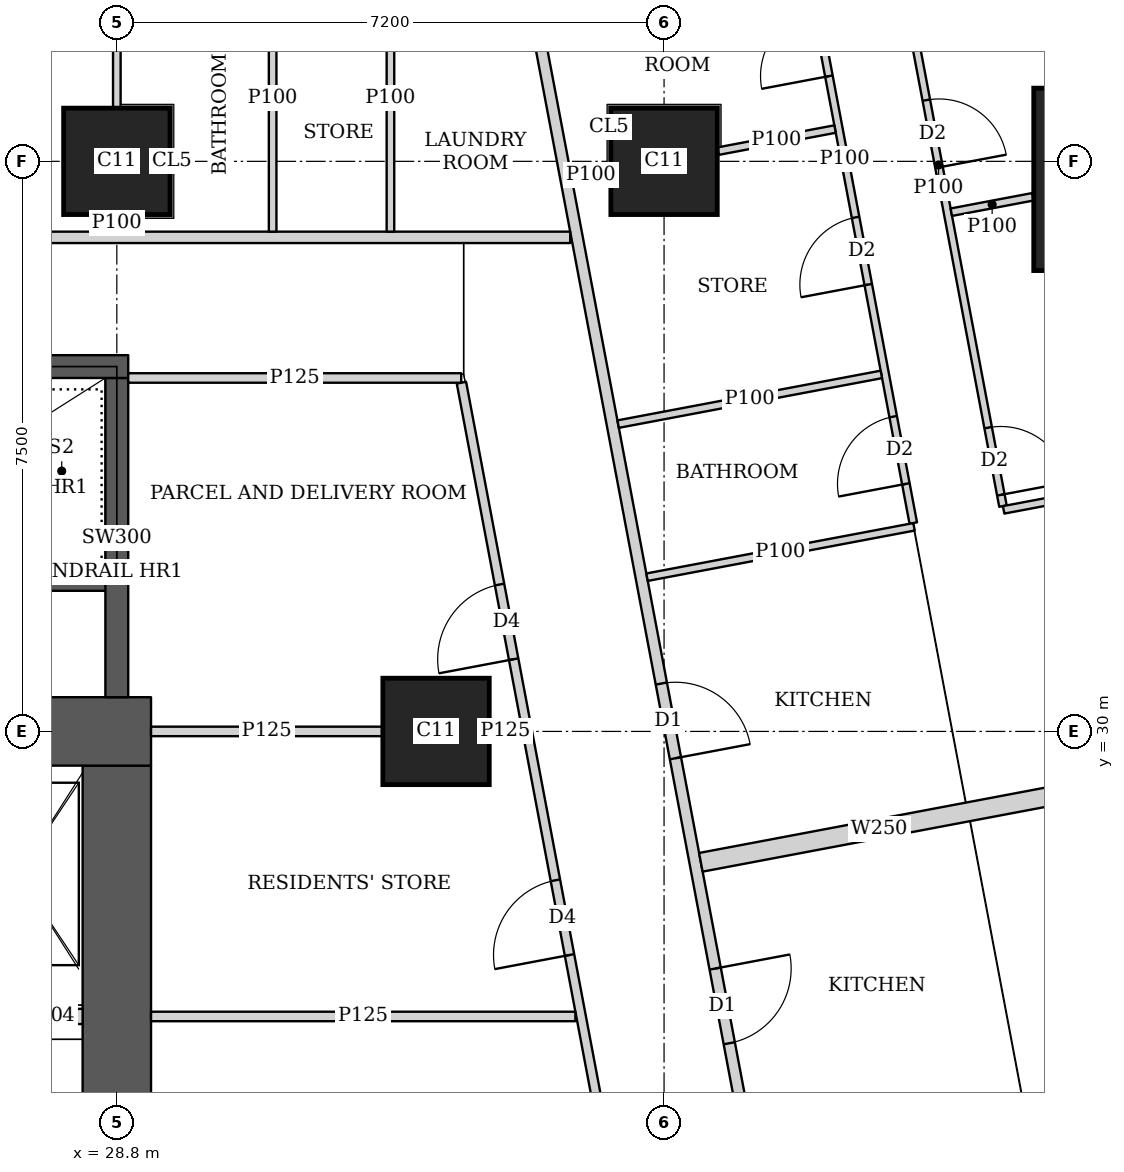
"""IFC4 building model, lengths in metres.
Left out: names, types, materials, properties, quantities, classifications, styles, units other than length and angle.
Written with IfcOpenShell. Run it as: python <this file> out.ifc"""

import sys

from ifc_helpers import new_model, si_unit, direction, frame, frame_2d, origin, origin_2d, place, context, subcontext, project, spatial, rectangle, extrude, element, fill, save


model = new_model("IFC4")
c1 = context("Model", 3, precision=1e-05, world=origin(), true_north=direction((0.0, 1.0)))
c2 = subcontext(c1, "Body", "Model", "MODEL_VIEW")
j1 = project(units=[si_unit("LENGTHUNIT", "METRE"), si_unit("PLANEANGLEUNIT", "RADIAN")], contexts=[c1])
p1 = place(None, origin())
s1 = spatial("IfcSite", under=j1, at=p1, CompositionType="ELEMENT")
p2 = place(p1, origin())
s2 = spatial("IfcBuilding", under=s1, at=p2, CompositionType="ELEMENT")
p3 = place(p2, frame((0.0, 0.0, 212.45)))
s3 = spatial("IfcBuildingStorey", under=s2, at=p3, CompositionType="ELEMENT", Elevation=212.45)
for number, where, z_axis, x_axis in (
    (1, (33.0, 30.0, 0.0), (0.0, 0.0, 1.0), (1.0, 0.0, 0.0)),
    (2, (28.8, 37.5, 0.0), (0.0, 0.0, 1.0), (1.0, 0.0, 0.0)),
    (3, (36.0, 37.5, 0.0), (0.0, 0.0, 1.0), (1.0, 0.0, 0.0)),
):
    element("IfcColumn", number, at=place(p3, frame(where, z_axis=z_axis, x_axis=x_axis)), inside=s3, PredefinedType="COLUMN", context=c2, shape_type="SweptSolid", body=[
        extrude(rectangle(XDim=1.4, YDim=1.4, at=origin_2d()), origin(), (0.0, 0.0, 1.0), 3.75),
    ])
p4 = place(p3, frame((42.064, 37.263, 0.0), z_axis=(0.0, 0.0, 1.0), x_axis=(1.0, 0.0, 0.0)))
e4 = element("IfcColumn", 4, at=p4, inside=s3, PredefinedType="COLUMN", context=c2, shape_type="SweptSolid", body=[
    extrude(rectangle(XDim=2.4, YDim=2.4, at=origin_2d()), origin(), (0.0, 0.0, 1.0), 3.75),
])
p5 = place(p3, frame((13.95, 30.0, 0.0), z_axis=(0.0, 0.0, 1.0), x_axis=(1.0, 0.0, 0.0)))
e5 = element("IfcWall", 5, at=p5, inside=s3, PredefinedType="SHEAR", context=c2, shape_type="SweptSolid", body=[
    extrude(rectangle(XDim=15.3, YDim=0.9, at=frame_2d((7.65, 0.0))), origin(), (0.0, 0.0, 1.0), 3.75),
])
p6 = place(p5, frame((4.45, 0.0, 0.0)))
e6 = element("IfcOpeningElement", 6, at=p6, cuts=e5, PredefinedType="OPENING", context=c2, shape_type="SweptSolid", body=[
    extrude(rectangle(XDim=1.8, YDim=2.1, at=frame_2d((0.9, 1.05))), frame((0.0, 0.46, 0.0), z_axis=(0.0, -1.0, 0.0), x_axis=(1.0, 0.0, 0.0)), (0.0, 0.0, 1.0), 0.92),
])
p7 = place(p5, frame((10.7, 0.0, 0.0)))
e7 = element("IfcOpeningElement", 7, at=p7, cuts=e5, PredefinedType="OPENING", context=c2, shape_type="SweptSolid", body=[
    extrude(rectangle(XDim=1.1, YDim=2.1, at=frame_2d((0.55, 1.05))), frame((0.0, 0.46, 0.0), z_axis=(0.0, -1.0, 0.0), x_axis=(1.0, 0.0, 0.0)), (0.0, 0.0, 1.0), 0.92),
])
p8 = place(p3, frame((28.8, 15.45, 0.0), z_axis=(0.0, 0.0, 1.0), x_axis=(0.0, 1.0, 0.0)))
e8 = element("IfcWall", 8, at=p8, inside=s3, PredefinedType="SHEAR", context=c2, shape_type="SweptSolid", body=[
    extrude(rectangle(XDim=14.1, YDim=0.9, at=frame_2d((7.05, 0.0))), origin(), (0.0, 0.0, 1.0), 3.75),
])
p9 = place(p3, frame((21.45, 34.8, 0.0), z_axis=(0.0, 0.0, 1.0), x_axis=(1.0, 0.0, 0.0)))
e9 = element("IfcWall", 9, at=p9, inside=s3, PredefinedType="SHEAR", context=c2, shape_type="SweptSolid", body=[
    extrude(rectangle(XDim=7.5, YDim=0.3, at=frame_2d((3.75, 0.0))), origin(), (0.0, 0.0, 1.0), 3.75),
])
p10 = place(p9, frame((0.5, 0.0, 0.0)))
e10 = element("IfcOpeningElement", 10, at=p10, cuts=e9, PredefinedType="OPENING", context=c2, shape_type="SweptSolid", body=[
    extrude(rectangle(XDim=1.1, YDim=2.1, at=frame_2d((0.55, 1.05))), frame((0.0, 0.16, 0.0), z_axis=(0.0, -1.0, 0.0), x_axis=(1.0, 0.0, 0.0)), (0.0, 0.0, 1.0), 0.32),
])
p11 = place(p3, frame((28.8, 30.45, 0.0), z_axis=(0.0, 0.0, 1.0), x_axis=(0.0, 1.0, 0.0)))
e11 = element("IfcWall", 11, at=p11, inside=s3, PredefinedType="SHEAR", context=c2, shape_type="SweptSolid", body=[
    extrude(rectangle(XDim=4.2, YDim=0.3, at=frame_2d((2.1, 0.0))), origin(), (0.0, 0.0, 1.0), 3.75),
])
p12 = place(p3, frame((9.001, 36.5, 0.0), z_axis=(0.0, 0.0, 1.0), x_axis=(1.0, 0.0, 0.0)))
e12 = element("IfcWall", 12, at=p12, inside=s3, PredefinedType="SOLIDWALL", context=c2, shape_type="SweptSolid", body=[
    extrude(rectangle(XDim=25.764, YDim=0.15, at=frame_2d((12.882, 0.0))), origin(), (0.0, 0.0, 1.0), 3.5),
])
p13 = place(p12, frame((0.874, 0.0, 0.0)))
e13 = element("IfcOpeningElement", 13, at=p13, cuts=e12, PredefinedType="OPENING", context=c2, shape_type="SweptSolid", body=[
    extrude(rectangle(XDim=1.0, YDim=2.1, at=frame_2d((0.5, 1.05))), frame((0.0, 0.085, 0.0), z_axis=(0.0, -1.0, 0.0), x_axis=(1.0, 0.0, 0.0)), (0.0, 0.0, 1.0), 0.17),
])
p14 = place(p12, frame((10.099, 0.0, 0.0)))
e14 = element("IfcOpeningElement", 14, at=p14, cuts=e12, PredefinedType="OPENING", context=c2, shape_type="SweptSolid", body=[
    extrude(rectangle(XDim=1.0, YDim=2.1, at=frame_2d((0.5, 1.05))), frame((0.0, 0.085, 0.0), z_axis=(0.0, -1.0, 0.0), x_axis=(1.0, 0.0, 0.0)), (0.0, 0.0, 1.0), 0.17),
])
p15 = place(p12, frame((17.356, 0.0, 0.0)))
e15 = element("IfcOpeningElement", 15, at=p15, cuts=e12, PredefinedType="OPENING", context=c2, shape_type="SweptSolid", body=[
    extrude(rectangle(XDim=1.0, YDim=2.1, at=frame_2d((0.5, 1.05))), frame((0.0, 0.085, 0.0), z_axis=(0.0, -1.0, 0.0), x_axis=(1.0, 0.0, 0.0)), (0.0, 0.0, 1.0), 0.17),
])
p16 = place(p3, frame((33.68, 42.723, 0.0), z_axis=(0.0, 0.0, 1.0), x_axis=(0.185601160014, -0.982625162207, 0.0)))
e16 = element("IfcWall", 16, at=p16, inside=s3, PredefinedType="SOLIDWALL", context=c2, shape_type="SweptSolid", body=[
    extrude(rectangle(XDim=41.051, YDim=0.15, at=frame_2d((20.526, 0.0))), origin(), (0.0, 0.0, 1.0), 2.5),
])
p17 = place(p16, frame((12.307, 0.0, 0.0)))
e17 = element("IfcOpeningElement", 17, at=p17, cuts=e16, PredefinedType="OPENING", context=c2, shape_type="SweptSolid", body=[
    extrude(rectangle(XDim=1.0, YDim=2.1, at=frame_2d((0.5, 1.05))), frame((0.0, 0.085, 0.0), z_axis=(0.0, -1.0, 0.0), x_axis=(1.0, 0.0, 0.0)), (0.0, 0.0, 1.0), 0.17),
])
p18 = place(p16, frame((16.123, 0.0, 0.0)))
e18 = element("IfcOpeningElement", 18, at=p18, cuts=e16, PredefinedType="OPENING", context=c2, shape_type="SweptSolid", body=[
    extrude(rectangle(XDim=1.0, YDim=2.1, at=frame_2d((0.5, 1.05))), frame((0.0, 0.085, 0.0), z_axis=(0.0, -1.0, 0.0), x_axis=(1.0, 0.0, 0.0)), (0.0, 0.0, 1.0), 0.17),
])
p19 = place(p16, frame((30.902, 0.0, 0.0)))
e19 = element("IfcOpeningElement", 19, at=p19, cuts=e16, PredefinedType="OPENING", context=c2, shape_type="SweptSolid", body=[
    extrude(rectangle(XDim=1.0, YDim=2.1, at=frame_2d((0.5, 1.05))), frame((0.0, 0.085, 0.0), z_axis=(0.0, -1.0, 0.0), x_axis=(1.0, 0.0, 0.0)), (0.0, 0.0, 1.0), 0.17),
])
p20 = place(p3, frame((38.764, 41.941, 0.0), z_axis=(0.0, 0.0, 1.0), x_axis=(0.185548572312, -0.982635093671, 0.0)))
e20 = element("IfcWall", 20, at=p20, inside=s3, PredefinedType="PARTITIONING", context=c2, shape_type="SweptSolid", body=[
    extrude(rectangle(XDim=9.135, YDim=0.1, at=frame_2d((4.568, 0.0))), origin(), (0.0, 0.0, 1.0), 3.5),
])
p21 = place(p20, frame((8.085, 0.0, 0.0)))
e21 = element("IfcOpeningElement", 21, at=p21, cuts=e20, PredefinedType="OPENING", context=c2, shape_type="SweptSolid", body=[
    extrude(rectangle(XDim=0.9, YDim=2.1, at=frame_2d((0.45, 1.05))), frame((0.0, 0.06, 0.0), z_axis=(0.0, -1.0, 0.0), x_axis=(1.0, 0.0, 0.0)), (0.0, 0.0, 1.0), 0.12),
])
p22 = place(p20, frame((3.7, 0.0, 0.0)))
e22 = element("IfcOpeningElement", 22, at=p22, cuts=e20, PredefinedType="OPENING", context=c2, shape_type="SweptSolid", body=[
    extrude(rectangle(XDim=0.9, YDim=2.1, at=frame_2d((0.45, 1.05))), frame((0.0, 0.06, 0.0), z_axis=(0.0, -1.0, 0.0), x_axis=(1.0, 0.0, 0.0)), (0.0, 0.0, 1.0), 0.12),
])
p23 = place(p3, frame((37.473, 42.309, 0.0), z_axis=(0.0, 0.0, 1.0), x_axis=(0.185491912953, -0.982645790827, 0.0)))
e23 = element("IfcWall", 23, at=p23, inside=s3, PredefinedType="PARTITIONING", context=c2, shape_type="SweptSolid", body=[
    extrude(rectangle(XDim=9.737, YDim=0.1, at=frame_2d((4.869, 0.0))), origin(), (0.0, 0.0, 1.0), 3.5),
])
p24 = place(p23, frame((8.312, 0.0, 0.0)))
e24 = element("IfcOpeningElement", 24, at=p24, cuts=e23, PredefinedType="OPENING", context=c2, shape_type="SweptSolid", body=[
    extrude(rectangle(XDim=0.9, YDim=2.1, at=frame_2d((0.45, 1.05))), frame((0.0, 0.06, 0.0), z_axis=(0.0, -1.0, 0.0), x_axis=(1.0, 0.0, 0.0)), (0.0, 0.0, 1.0), 0.12),
])
p25 = place(p23, frame((2.853, 0.0, 0.0)))
e25 = element("IfcOpeningElement", 25, at=p25, cuts=e23, PredefinedType="OPENING", context=c2, shape_type="SweptSolid", body=[
    extrude(rectangle(XDim=0.9, YDim=2.1, at=frame_2d((0.45, 1.05))), frame((0.0, 0.06, 0.0), z_axis=(0.0, -1.0, 0.0), x_axis=(1.0, 0.0, 0.0)), (0.0, 0.0, 1.0), 0.12),
])
p26 = place(p23, frame((5.644, 0.0, 0.0)))
e26 = element("IfcOpeningElement", 26, at=p26, cuts=e23, PredefinedType="OPENING", context=c2, shape_type="SweptSolid", body=[
    extrude(rectangle(XDim=0.9, YDim=2.1, at=frame_2d((0.45, 1.05))), frame((0.0, 0.06, 0.0), z_axis=(0.0, -1.0, 0.0), x_axis=(1.0, 0.0, 0.0)), (0.0, 0.0, 1.0), 0.12),
])
p27 = place(p3, frame((40.854, 37.034, 0.0), z_axis=(0.0, 0.0, 1.0), x_axis=(-0.982651678759, -0.185460718839, 0.0)))
e27 = element("IfcWall", 27, at=p27, inside=s3, PredefinedType="PARTITIONING", context=c2, shape_type="SweptSolid", body=[
    extrude(rectangle(XDim=1.094, YDim=0.1, at=frame_2d((0.547, 0.0))), origin(), (0.0, 0.0, 1.0), 3.5),
])
p28 = place(p3, frame((44.693, 33.713, 0.0), z_axis=(0.0, 0.0, 1.0), x_axis=(-0.982633535512, -0.185556823879, 0.0)))
e28 = element("IfcWall", 28, at=p28, inside=s3, PredefinedType="PARTITIONING", context=c2, shape_type="SweptSolid", body=[
    extrude(rectangle(XDim=4.3, YDim=0.1, at=frame_2d((2.15, 0.0))), origin(), (0.0, 0.0, 1.0), 2.05),
])
p29 = place(p3, frame((38.25, 37.925, 0.0), z_axis=(0.0, 0.0, 1.0), x_axis=(-0.982610209589, -0.185680305934, 0.0)))
e29 = element("IfcWall", 29, at=p29, inside=s3, PredefinedType="PARTITIONING", context=c2, shape_type="SweptSolid", body=[
    extrude(rectangle(XDim=1.567, YDim=0.1, at=frame_2d((0.784, 0.0))), origin(), (0.0, 0.0, 1.0), 3.5),
])
p30 = place(p3, frame((35.29, 37.366, 0.0), z_axis=(0.0, 0.0, 1.0), x_axis=(-0.982715597703, -0.185121727606, 0.0)))
e30 = element("IfcWall", 30, at=p30, inside=s3, PredefinedType="PARTITIONING", context=c2, shape_type="SweptSolid", body=[
    extrude(rectangle(XDim=0.513, YDim=0.1, at=frame_2d((0.256, 0.0))), origin(), (0.0, 0.0, 1.0), 3.5),
])
p31 = place(p3, frame((39.289, 32.692, 0.0), z_axis=(0.0, 0.0, 1.0), x_axis=(-0.982662827464, -0.185401638399, 0.0)))
e31 = element("IfcWall", 31, at=p31, inside=s3, PredefinedType="PARTITIONING", context=c2, shape_type="SweptSolid", body=[
    extrude(rectangle(XDim=3.575, YDim=0.1, at=frame_2d((1.788, 0.0))), origin(), (0.0, 0.0, 1.0), 3.5),
])
p32 = place(p3, frame((38.859, 34.697, 0.0), z_axis=(0.0, 0.0, 1.0), x_axis=(-0.982626628545, -0.185593396635, 0.0)))
e32 = element("IfcWall", 32, at=p32, inside=s3, PredefinedType="PARTITIONING", context=c2, shape_type="SweptSolid", body=[
    extrude(rectangle(XDim=3.524, YDim=0.1, at=frame_2d((1.762, 0.0))), origin(), (0.0, 0.0, 1.0), 3.5),
])
p33 = place(p3, frame((41.177, 29.164, 0.0), z_axis=(0.0, 0.0, 1.0), x_axis=(-0.982642846239, -0.185507511263, 0.0)))
e33 = element("IfcWall", 33, at=p33, inside=s3, PredefinedType="SOLIDWALL", context=c2, shape_type="SweptSolid", body=[
    extrude(rectangle(XDim=4.776, YDim=0.25, at=frame_2d((2.388, 0.0))), origin(), (0.0, 0.0, 1.0), 2.5),
])
p34 = place(p3, frame((28.8, 36.575, 0.0), z_axis=(0.0, 0.0, 1.0), x_axis=(0.0, 1.0, 0.0)))
e34 = element("IfcWall", 34, at=p34, inside=s3, PredefinedType="PARTITIONING", context=c2, shape_type="SweptSolid", body=[
    extrude(rectangle(XDim=0.224, YDim=0.1, at=frame_2d((0.112, 0.0))), origin(), (0.0, 0.0, 1.0), 3.5),
])
p35 = place(p3, frame((28.8, 38.201, 0.0), z_axis=(0.0, 0.0, 1.0), x_axis=(0.0, 1.0, 0.0)))
e35 = element("IfcWall", 35, at=p35, inside=s3, PredefinedType="PARTITIONING", context=c2, shape_type="SweptSolid", body=[
    extrude(rectangle(XDim=1.899, YDim=0.1, at=frame_2d((0.95, 0.0))), origin(), (0.0, 0.0, 1.0), 3.5),
])
for number, where, z_axis, x_axis in (
    (36, (32.4, 36.575, 0.0), (0.0, 0.0, 1.0), (0.0, 1.0, 0.0)),
    (37, (30.85, 36.575, 0.0), (0.0, 0.0, 1.0), (0.0, 1.0, 0.0)),
):
    element("IfcWall", number, at=place(p3, frame(where, z_axis=z_axis, x_axis=x_axis)), inside=s3, PredefinedType="PARTITIONING", context=c2, shape_type="SweptSolid", body=[
        extrude(rectangle(XDim=3.525, YDim=0.1, at=frame_2d((1.763, 0.0))), origin(), (0.0, 0.0, 1.0), 3.5),
    ])
p36 = place(p3, frame((28.95, 34.65, 0.0), z_axis=(0.0, 0.0, 1.0), x_axis=(1.0, 0.0, 0.0)))
e38 = element("IfcWall", 38, at=p36, inside=s3, PredefinedType="PARTITIONING", context=c2, shape_type="SweptSolid", body=[
    extrude(rectangle(XDim=4.381, YDim=0.125, at=frame_2d((2.19, 0.0))), origin(), (0.0, 0.0, 1.0), 3.5),
])
p37 = place(p3, frame((37.9, 10.413, 0.0), z_axis=(0.0, 0.0, 1.0), x_axis=(-0.185589740669, 0.982627319058, 0.0)))
e39 = element("IfcWall", 39, at=p37, inside=s3, PredefinedType="PARTITIONING", context=c2, shape_type="SweptSolid", body=[
    extrude(rectangle(XDim=24.602, YDim=0.125, at=frame_2d((12.301, 0.0))), origin(), (0.0, 0.0, 1.0), 2.5),
])
p38 = place(p37, frame((0.708, 0.0, 0.0)))
e40 = element("IfcOpeningElement", 40, at=p38, cuts=e39, PredefinedType="OPENING", context=c2, shape_type="SweptSolid", body=[
    extrude(rectangle(XDim=1.0, YDim=2.1, at=frame_2d((0.5, 1.05))), frame((0.0, 0.073, 0.0), z_axis=(0.0, -1.0, 0.0), x_axis=(1.0, 0.0, 0.0)), (0.0, 0.0, 1.0), 0.145),
])
p39 = place(p37, frame((5.65, 0.0, 0.0)))
e41 = element("IfcOpeningElement", 41, at=p39, cuts=e39, PredefinedType="OPENING", context=c2, shape_type="SweptSolid", body=[
    extrude(rectangle(XDim=1.0, YDim=2.1, at=frame_2d((0.5, 1.05))), frame((0.0, 0.073, 0.0), z_axis=(0.0, -1.0, 0.0), x_axis=(1.0, 0.0, 0.0)), (0.0, 0.0, 1.0), 0.145),
])
p40 = place(p37, frame((13.124, 0.0, 0.0)))
e42 = element("IfcOpeningElement", 42, at=p40, cuts=e39, PredefinedType="OPENING", context=c2, shape_type="SweptSolid", body=[
    extrude(rectangle(XDim=1.0, YDim=2.1, at=frame_2d((0.5, 1.05))), frame((0.0, 0.073, 0.0), z_axis=(0.0, -1.0, 0.0), x_axis=(1.0, 0.0, 0.0)), (0.0, 0.0, 1.0), 0.145),
])
p41 = place(p37, frame((16.94, 0.0, 0.0)))
e43 = element("IfcOpeningElement", 43, at=p41, cuts=e39, PredefinedType="OPENING", context=c2, shape_type="SweptSolid", body=[
    extrude(rectangle(XDim=1.0, YDim=2.1, at=frame_2d((0.5, 1.05))), frame((0.0, 0.073, 0.0), z_axis=(0.0, -1.0, 0.0), x_axis=(1.0, 0.0, 0.0)), (0.0, 0.0, 1.0), 0.145),
])
p42 = place(p37, frame((20.9, 0.0, 0.0)))
e44 = element("IfcOpeningElement", 44, at=p42, cuts=e39, PredefinedType="OPENING", context=c2, shape_type="SweptSolid", body=[
    extrude(rectangle(XDim=1.0, YDim=2.1, at=frame_2d((0.5, 1.05))), frame((0.0, 0.073, 0.0), z_axis=(0.0, -1.0, 0.0), x_axis=(1.0, 0.0, 0.0)), (0.0, 0.0, 1.0), 0.145),
])
p43 = place(p3, frame((29.25, 26.25, 0.0), z_axis=(0.0, 0.0, 1.0), x_axis=(1.0, 0.0, 0.0)))
e45 = element("IfcWall", 45, at=p43, inside=s3, PredefinedType="PARTITIONING", context=c2, shape_type="SweptSolid", body=[
    extrude(rectangle(XDim=5.583, YDim=0.125, at=frame_2d((2.792, 0.0))), origin(), (0.0, 0.0, 1.0), 3.5),
])
p44 = place(p3, frame((29.25, 30.0, 0.0), z_axis=(0.0, 0.0, 1.0), x_axis=(1.0, 0.0, 0.0)))
e46 = element("IfcWall", 46, at=p44, inside=s3, PredefinedType="PARTITIONING", context=c2, shape_type="SweptSolid", body=[
    extrude(rectangle(XDim=3.049, YDim=0.125, at=frame_2d((1.524, 0.0))), origin(), (0.0, 0.0, 1.0), 3.5),
])
p45 = place(p3, frame((33.701, 30.0, 0.0), z_axis=(0.0, 0.0, 1.0), x_axis=(1.0, 0.0, 0.0)))
e47 = element("IfcWall", 47, at=p45, inside=s3, PredefinedType="PARTITIONING", context=c2, shape_type="SweptSolid", body=[
    extrude(rectangle(XDim=0.424, YDim=0.125, at=frame_2d((0.212, 0.0))), origin(), (0.0, 0.0, 1.0), 2.5),
])
p46 = place(p3, frame((23.0, 31.95, 0.0), z_axis=(0.0, 0.0, 1.0), x_axis=(1.0, 0.0, 0.0)))
e48 = element("IfcWall", 48, at=p46, inside=s3, PredefinedType="SHEAR", context=c2, shape_type="SweptSolid", body=[
    extrude(rectangle(XDim=5.8, YDim=0.2, at=frame_2d((2.9, 0.0))), origin(), (0.0, 0.0, 1.0), 3.75),
])
p47 = place(p3, frame((27.4, 26.25, 0.0), z_axis=(0.0, 0.0, 1.0), x_axis=(1.0, 0.0, 0.0)))
e49 = element("IfcWall", 49, at=p47, inside=s3, PredefinedType="SOLIDWALL", context=c2, shape_type="SweptSolid", body=[
    extrude(rectangle(XDim=0.95, YDim=0.2, at=frame_2d((0.475, 0.0))), origin(), (0.0, 0.0, 1.0), 3.5),
])
p48 = place(p21, origin())
e50 = element("IfcDoor", 50, at=p48, inside=s3, OperationType="SINGLE_SWING_RIGHT", PredefinedType="DOOR", context=c2, shape_type="SweptSolid", body=[
    extrude(rectangle(XDim=0.9, YDim=2.1, at=frame_2d((0.45, 1.05))), frame((0.0, 0.025, 0.0), z_axis=(0.0, -1.0, 0.0), x_axis=(1.0, 0.0, 0.0)), (0.0, 0.0, 1.0), 0.05),
])
fill(e21, e50)
p49 = place(p22, origin())
e51 = element("IfcDoor", 51, at=p49, inside=s3, OperationType="SINGLE_SWING_RIGHT", PredefinedType="DOOR", context=c2, shape_type="SweptSolid", body=[
    extrude(rectangle(XDim=0.9, YDim=2.1, at=frame_2d((0.45, 1.05))), frame((0.0, 0.025, 0.0), z_axis=(0.0, -1.0, 0.0), x_axis=(1.0, 0.0, 0.0)), (0.0, 0.0, 1.0), 0.05),
])
fill(e22, e51)
p50 = place(p24, origin())
e52 = element("IfcDoor", 52, at=p50, inside=s3, OperationType="SINGLE_SWING_LEFT", PredefinedType="DOOR", context=c2, shape_type="SweptSolid", body=[
    extrude(rectangle(XDim=0.9, YDim=2.1, at=frame_2d((0.45, 1.05))), frame((0.0, 0.025, 0.0), z_axis=(0.0, -1.0, 0.0), x_axis=(1.0, 0.0, 0.0)), (0.0, 0.0, 1.0), 0.05),
])
fill(e24, e52)
p51 = place(p25, origin())
e53 = element("IfcDoor", 53, at=p51, inside=s3, OperationType="SINGLE_SWING_LEFT", PredefinedType="DOOR", context=c2, shape_type="SweptSolid", body=[
    extrude(rectangle(XDim=0.9, YDim=2.1, at=frame_2d((0.45, 1.05))), frame((0.0, 0.025, 0.0), z_axis=(0.0, -1.0, 0.0), x_axis=(1.0, 0.0, 0.0)), (0.0, 0.0, 1.0), 0.05),
])
fill(e25, e53)
p52 = place(p26, origin())
e54 = element("IfcDoor", 54, at=p52, inside=s3, OperationType="SINGLE_SWING_LEFT", PredefinedType="DOOR", context=c2, shape_type="SweptSolid", body=[
    extrude(rectangle(XDim=0.9, YDim=2.1, at=frame_2d((0.45, 1.05))), frame((0.0, 0.025, 0.0), z_axis=(0.0, -1.0, 0.0), x_axis=(1.0, 0.0, 0.0)), (0.0, 0.0, 1.0), 0.05),
])
fill(e26, e54)
p53 = place(p17, origin())
e55 = element("IfcDoor", 55, at=p53, inside=s3, OperationType="SINGLE_SWING_RIGHT", PredefinedType="DOOR", context=c2, shape_type="SweptSolid", body=[
    extrude(rectangle(XDim=1.0, YDim=2.1, at=frame_2d((0.5, 1.05))), frame((0.0, 0.025, 0.0), z_axis=(0.0, -1.0, 0.0), x_axis=(1.0, 0.0, 0.0)), (0.0, 0.0, 1.0), 0.05),
])
fill(e17, e55)
p54 = place(p18, origin())
e56 = element("IfcDoor", 56, at=p54, inside=s3, OperationType="SINGLE_SWING_LEFT", PredefinedType="DOOR", context=c2, shape_type="SweptSolid", body=[
    extrude(rectangle(XDim=1.0, YDim=2.1, at=frame_2d((0.5, 1.05))), frame((0.0, 0.025, 0.0), z_axis=(0.0, -1.0, 0.0), x_axis=(1.0, 0.0, 0.0)), (0.0, 0.0, 1.0), 0.05),
])
fill(e18, e56)
p55 = place(p41, origin())
e57 = element("IfcDoor", 57, at=p55, inside=s3, OperationType="SINGLE_SWING_LEFT", PredefinedType="DOOR", context=c2, shape_type="SweptSolid", body=[
    extrude(rectangle(XDim=1.0, YDim=2.1, at=frame_2d((0.5, 1.05))), frame((0.0, 0.025, 0.0), z_axis=(0.0, -1.0, 0.0), x_axis=(1.0, 0.0, 0.0)), (0.0, 0.0, 1.0), 0.05),
])
fill(e43, e57)
p56 = place(p42, origin())
e58 = element("IfcDoor", 58, at=p56, inside=s3, OperationType="SINGLE_SWING_LEFT", PredefinedType="DOOR", context=c2, shape_type="SweptSolid", body=[
    extrude(rectangle(XDim=1.0, YDim=2.1, at=frame_2d((0.5, 1.05))), frame((0.0, 0.025, 0.0), z_axis=(0.0, -1.0, 0.0), x_axis=(1.0, 0.0, 0.0)), (0.0, 0.0, 1.0), 0.05),
])
fill(e44, e58)
save(model, sys.argv[1])
